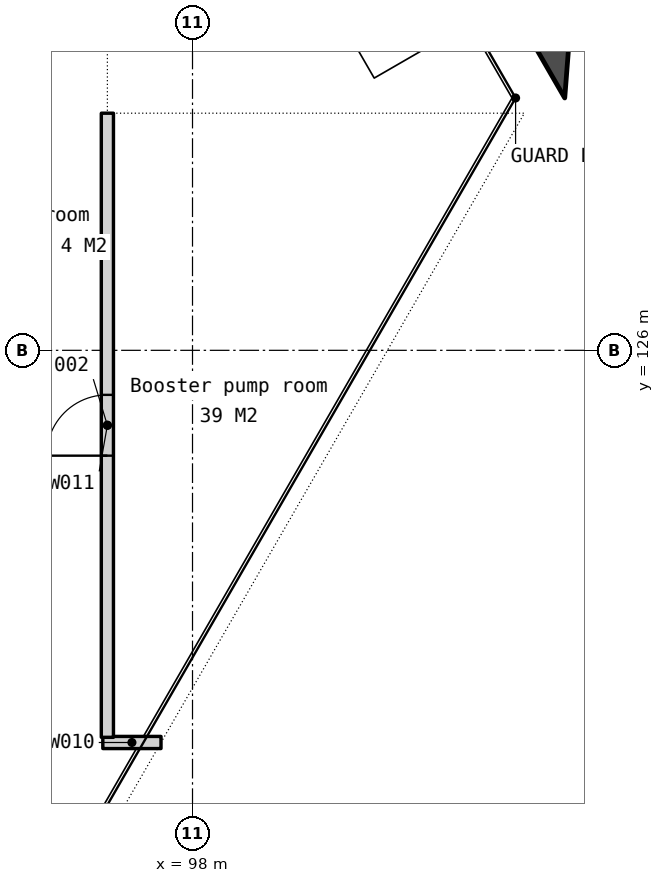
"""IFC4 building model, lengths in metres.
Left out: names, types, materials, properties, quantities, classifications, styles, units other than length and angle.
Written with IfcOpenShell. Run it as: python <this file> out.ifc"""

import sys

from ifc_helpers import new_model, si_unit, direction, frame, frame_2d, origin, place, context, subcontext, project, spatial, polyline, rectangle, outline, extrude, element, fill, save


model = new_model("IFC4")
c1 = context("Model", 3, precision=1e-05, world=origin(), true_north=direction((0.0, 1.0)))
c2 = subcontext(c1, "Body", "Model", "MODEL_VIEW")
j1 = project(units=[si_unit("LENGTHUNIT", "METRE"), si_unit("PLANEANGLEUNIT", "RADIAN")], contexts=[c1])
p1 = place(None, origin())
s1 = spatial("IfcSite", under=j1, at=p1, CompositionType="ELEMENT")
p2 = place(p1, origin())
s2 = spatial("IfcBuilding", under=s1, at=p2, CompositionType="ELEMENT")
p3 = place(p2, frame((0.0, 0.0, 123.8)))
s3 = spatial("IfcBuildingStorey", under=s2, at=p3, CompositionType="ELEMENT", Elevation=123.8)
p4 = place(p3, frame((0.0, 0.0, -0.25)))
e1 = element("IfcWall", 1, at=p4, inside=s3, PredefinedType="SOLIDWALL", context=c2, shape_type="SweptSolid", body=[
    extrude(outline(polyline([(104.122, 130.15), (104.427, 134.108), (101.322, 135.0), (104.122, 130.15)])), origin(), (0.0, 0.0, 1.0), 4.6),
])
p5 = place(p3, frame((96.525, 119.55, 0.0), z_axis=(0.0, 0.0, 1.0), x_axis=(1.0, 0.0, 0.0)))
e2 = element("IfcWall", 2, at=p5, inside=s3, PredefinedType="PARTITIONING", context=c2, shape_type="SweptSolid", body=[
    extrude(rectangle(XDim=0.957, YDim=0.2, at=frame_2d((0.479, 0.0))), origin(), (0.0, 0.0, 1.0), 4.35),
])
p6 = place(p3, frame((96.6, 119.635, 0.0), z_axis=(0.0, 0.0, 1.0), x_axis=(0.0, 1.0, 0.0)))
e3 = element("IfcWall", 3, at=p6, inside=s3, PredefinedType="PARTITIONING", context=c2, shape_type="SweptSolid", body=[
    extrude(rectangle(XDim=10.265, YDim=0.2, at=frame_2d((5.132, 0.0))), origin(), (0.0, 0.0, 1.0), 4.35),
])
p7 = place(p6, frame((4.633, 0.0, 0.0)))
e4 = element("IfcOpeningElement", 4, at=p7, cuts=e3, PredefinedType="OPENING", context=c2, shape_type="SweptSolid", body=[
    extrude(rectangle(XDim=1.0, YDim=2.1, at=frame_2d((0.5, 1.05))), frame((0.0, 0.11, 0.0), z_axis=(0.0, -1.0, 0.0), x_axis=(1.0, 0.0, 0.0)), (0.0, 0.0, 1.0), 0.22),
])
p8 = place(p7, origin())
e5 = element("IfcDoor", 5, at=p8, inside=s3, OperationType="SINGLE_SWING_LEFT", PredefinedType="DOOR", context=c2, shape_type="SweptSolid", body=[
    extrude(rectangle(XDim=1.0, YDim=2.1, at=frame_2d((0.5, 1.05))), frame((0.0, 0.025, 0.0), z_axis=(0.0, -1.0, 0.0), x_axis=(1.0, 0.0, 0.0)), (0.0, 0.0, 1.0), 0.05),
])
fill(e4, e5)
save(model, sys.argv[1])
